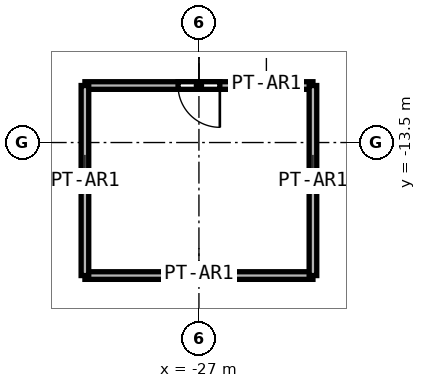
"""IFC4 building model, lengths in metres.
Left out: names, types, materials, properties, quantities, classifications, styles, units other than length and angle.
Written with IfcOpenShell. Run it as: python <this file> out.ifc"""

import sys

from ifc_helpers import new_model, si_unit, direction, frame, frame_2d, origin, place, context, subcontext, project, spatial, rectangle, extrude, element, fill, save


model = new_model("IFC4")
c1 = context("Model", 3, precision=1e-05, world=origin(), true_north=direction((0.0, 1.0)))
c2 = subcontext(c1, "Body", "Model", "MODEL_VIEW")
j1 = project(units=[si_unit("LENGTHUNIT", "METRE"), si_unit("PLANEANGLEUNIT", "RADIAN")], contexts=[c1])
p1 = place(None, origin())
s1 = spatial("IfcSite", under=j1, at=p1, CompositionType="ELEMENT")
p2 = place(p1, origin())
s2 = spatial("IfcBuilding", under=s1, at=p2, CompositionType="ELEMENT")
p3 = place(p2, origin())
s3 = spatial("IfcBuildingStorey", under=s2, at=p3, CompositionType="ELEMENT", Elevation=0.0)
p4 = place(p3, frame((-30.0, -17.0, 0.0), z_axis=(0.0, 0.0, 1.0), x_axis=(1.0, 0.0, 0.0)))
e1 = element("IfcWall", 1, at=p4, inside=s3, PredefinedType="PARTITIONING", context=c2, shape_type="SweptSolid", body=[
    extrude(rectangle(XDim=6.0, YDim=0.2, at=frame_2d((3.0, 0.0))), origin(), (0.0, 0.0, 1.0), 11.7),
])
p5 = place(p3, frame((-24.0, -12.0, 0.0), z_axis=(0.0, 0.0, 1.0), x_axis=(-1.0, 0.0, 0.0)))
e2 = element("IfcWall", 2, at=p5, inside=s3, PredefinedType="PARTITIONING", context=c2, shape_type="SweptSolid", body=[
    extrude(rectangle(XDim=6.0, YDim=0.2, at=frame_2d((3.0, 0.0))), origin(), (0.0, 0.0, 1.0), 11.7),
])
p6 = place(p5, frame((2.45, 0.0, 0.0)))
e3 = element("IfcOpeningElement", 3, at=p6, cuts=e2, PredefinedType="OPENING", context=c2, shape_type="SweptSolid", body=[
    extrude(rectangle(XDim=1.1, YDim=2.4, at=frame_2d((0.55, 1.2))), frame((0.0, 0.1, 0.0), z_axis=(0.0, -1.0, 0.0), x_axis=(1.0, 0.0, 0.0)), (0.0, 0.0, 1.0), 0.2),
])
for number, where, z_axis, x_axis in (
    (4, (-30.0, -12.0, 0.0), (0.0, 0.0, 1.0), (0.0, -1.0, 0.0)),
    (5, (-24.0, -17.0, 0.0), (0.0, 0.0, 1.0), (0.0, 1.0, 0.0)),
):
    element("IfcWall", number, at=place(p3, frame(where, z_axis=z_axis, x_axis=x_axis)), inside=s3, PredefinedType="PARTITIONING", context=c2, shape_type="SweptSolid", body=[
        extrude(rectangle(XDim=5.0, YDim=0.2, at=frame_2d((2.5, 0.0))), origin(), (0.0, 0.0, 1.0), 11.7),
    ])
p7 = place(p6, origin())
e6 = element("IfcDoor", 6, at=p7, inside=s3, OperationType="DOUBLE_DOOR_SINGLE_SWING", PredefinedType="DOOR", context=c2, shape_type="SweptSolid", body=[
    extrude(rectangle(XDim=1.1, YDim=2.4, at=frame_2d((0.55, 1.2))), frame((0.0, 0.025, 0.0), z_axis=(0.0, -1.0, 0.0), x_axis=(1.0, 0.0, 0.0)), (0.0, 0.0, 1.0), 0.05),
])
fill(e3, e6)
save(model, sys.argv[1])
